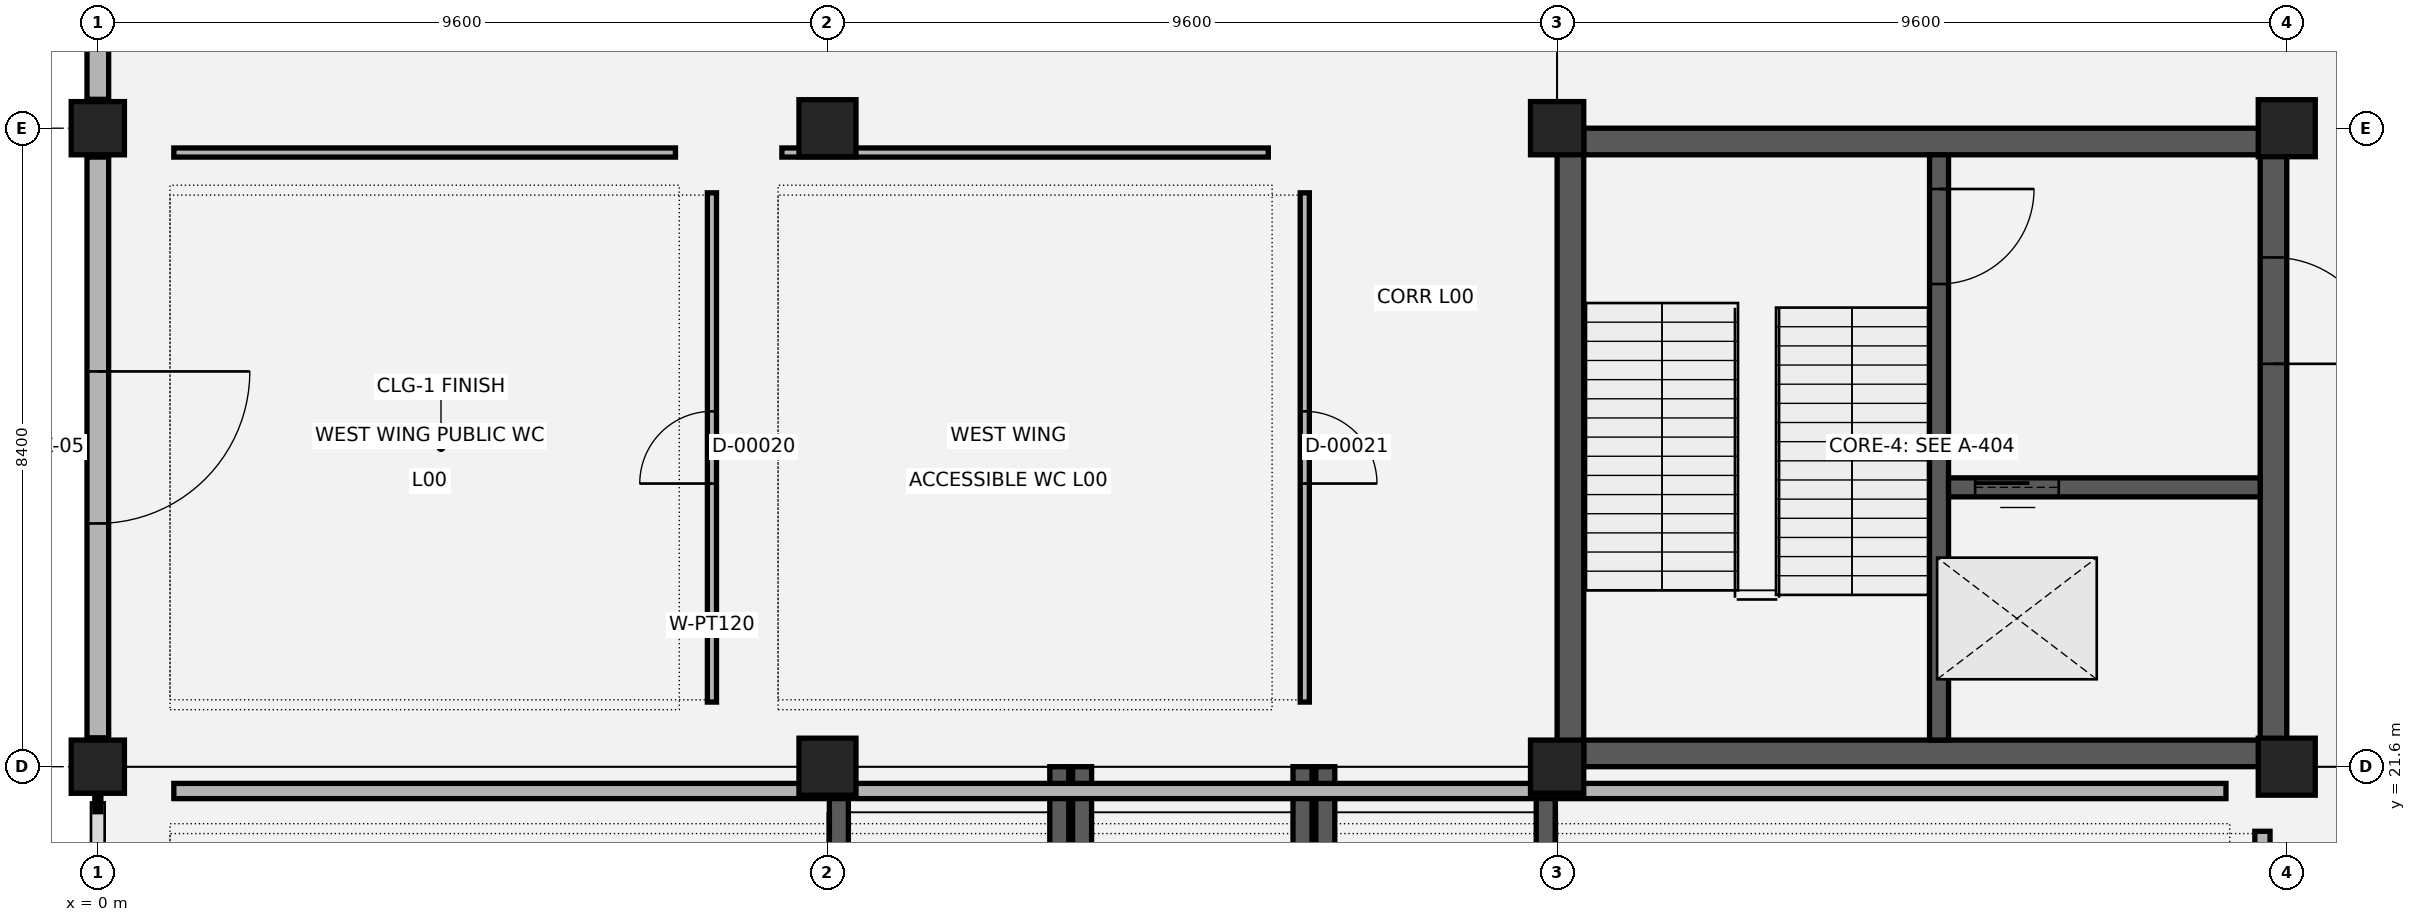
"""IFC4 building model, lengths in metres.
Left out: names, types, materials, properties, quantities, classifications, styles, units other than length and angle.
Written with IfcOpenShell. Run it as: python <this file> out.ifc"""

import sys

from ifc_helpers import new_model, si_unit, direction, frame, frame_2d, origin, origin_2d, place, context, subcontext, project, spatial, rectangle, extrude, element, fill, save


model = new_model("IFC4")
c1 = context("Model", 3, precision=1e-05, world=origin(), true_north=direction((0.0, 1.0)))
c2 = subcontext(c1, "Body", "Model", "MODEL_VIEW")
j1 = project(units=[si_unit("LENGTHUNIT", "METRE"), si_unit("PLANEANGLEUNIT", "RADIAN")], contexts=[c1])
p1 = place(None, origin())
s1 = spatial("IfcSite", under=j1, at=p1, CompositionType="ELEMENT")
p2 = place(p1, origin())
s2 = spatial("IfcBuilding", under=s1, at=p2, CompositionType="ELEMENT")
p3 = place(p2, origin())
s3 = spatial("IfcBuildingStorey", under=s2, at=p3, CompositionType="ELEMENT", Elevation=0.0)
for number, where, z_axis, x_axis in (
    (1, (0.0, 21.6, 0.0), (0.0, 0.0, 1.0), (1.0, 0.0, 0.0)),
    (2, (0.0, 30.0, 0.0), (0.0, 0.0, 1.0), (1.0, 0.0, 0.0)),
):
    element("IfcColumn", number, at=place(p3, frame(where, z_axis=z_axis, x_axis=x_axis)), inside=s3, PredefinedType="COLUMN", context=c2, shape_type="SweptSolid", body=[
        extrude(rectangle(XDim=0.7, YDim=0.7, at=origin_2d()), origin(), (0.0, 0.0, 1.0), 5.4),
    ])
for number, where, z_axis, x_axis in (
    (3, (9.6, 21.6, 0.0), (0.0, 0.0, 1.0), (1.0, 0.0, 0.0)),
    (4, (9.6, 30.0, 0.0), (0.0, 0.0, 1.0), (1.0, 0.0, 0.0)),
):
    element("IfcColumn", number, at=place(p3, frame(where, z_axis=z_axis, x_axis=x_axis)), inside=s3, PredefinedType="COLUMN", context=c2, shape_type="SweptSolid", body=[
        extrude(rectangle(XDim=0.75, YDim=0.75, at=origin_2d()), origin(), (0.0, 0.0, 1.0), 5.4),
    ])
for number, where, z_axis, x_axis in (
    (5, (19.2, 21.6, 0.0), (0.0, 0.0, 1.0), (1.0, 0.0, 0.0)),
    (6, (19.2, 30.0, 0.0), (0.0, 0.0, 1.0), (1.0, 0.0, 0.0)),
):
    element("IfcColumn", number, at=place(p3, frame(where, z_axis=z_axis, x_axis=x_axis)), inside=s3, PredefinedType="COLUMN", context=c2, shape_type="SweptSolid", body=[
        extrude(rectangle(XDim=0.7, YDim=0.7, at=origin_2d()), origin(), (0.0, 0.0, 1.0), 5.4),
    ])
for number, where, z_axis, x_axis in (
    (7, (28.8, 21.6, 0.0), (0.0, 0.0, 1.0), (1.0, 0.0, 0.0)),
    (8, (28.8, 30.0, 0.0), (0.0, 0.0, 1.0), (1.0, 0.0, 0.0)),
):
    element("IfcColumn", number, at=place(p3, frame(where, z_axis=z_axis, x_axis=x_axis)), inside=s3, PredefinedType="COLUMN", context=c2, shape_type="SweptSolid", body=[
        extrude(rectangle(XDim=0.75, YDim=0.75, at=origin_2d()), origin(), (0.0, 0.0, 1.0), 5.4),
    ])
for number, where, z_axis, x_axis in (
    (9, (9.75, 13.2, 0.0), (0.0, 0.0, 1.0), (0.0, 1.0, 0.0)),
    (10, (12.65, 13.2, 0.0), (0.0, 0.0, 1.0), (0.0, 1.0, 0.0)),
):
    element("IfcWall", number, at=place(p3, frame(where, z_axis=z_axis, x_axis=x_axis)), inside=s3, PredefinedType="SHEAR", context=c2, shape_type="SweptSolid", body=[
        extrude(rectangle(XDim=8.4, YDim=0.25, at=frame_2d((4.2, 0.0))), origin(), (0.0, 0.0, 1.0), 0.4),
    ])
for number, where, z_axis, x_axis in (
    (11, (12.95, 13.2, 0.0), (0.0, 0.0, 1.0), (0.0, 1.0, 0.0)),
    (12, (15.85, 13.2, 0.0), (0.0, 0.0, 1.0), (0.0, 1.0, 0.0)),
):
    element("IfcWall", number, at=place(p3, frame(where, z_axis=z_axis, x_axis=x_axis)), inside=s3, PredefinedType="SHEAR", context=c2, shape_type="SweptSolid", body=[
        extrude(rectangle(XDim=8.4, YDim=0.25, at=frame_2d((4.2, 0.0))), origin(), (0.0, 0.0, 1.0), 1.0),
    ])
for number, where, z_axis, x_axis in (
    (13, (16.15, 13.2, 0.0), (0.0, 0.0, 1.0), (0.0, 1.0, 0.0)),
    (14, (19.05, 13.2, 0.0), (0.0, 0.0, 1.0), (0.0, 1.0, 0.0)),
):
    element("IfcWall", number, at=place(p3, frame(where, z_axis=z_axis, x_axis=x_axis)), inside=s3, PredefinedType="SHEAR", context=c2, shape_type="SweptSolid", body=[
        extrude(rectangle(XDim=8.4, YDim=0.25, at=frame_2d((4.2, 0.0))), origin(), (0.0, 0.0, 1.0), 1.6),
    ])
p4 = place(p3, frame((0.0, 29.62, 0.0), z_axis=(0.0, 0.0, 1.0), x_axis=(0.0, -1.0, 0.0)))
e15 = element("IfcWall", 15, at=p4, inside=s3, PredefinedType="SOLIDWALL", context=c2, shape_type="SweptSolid", body=[
    extrude(rectangle(XDim=7.64, YDim=0.285, at=frame_2d((3.82, 0.0))), origin(), (0.0, 0.0, 1.0), 4.04),
])
p5 = place(p4, frame((2.82, 0.0, 0.0)))
e16 = element("IfcOpeningElement", 16, at=p5, cuts=e15, PredefinedType="OPENING", context=c2, shape_type="SweptSolid", body=[
    extrude(rectangle(XDim=2.0, YDim=2.2, at=frame_2d((1.0, 1.1))), frame((0.0, 0.152, 0.0), z_axis=(0.0, -1.0, 0.0), x_axis=(1.0, 0.0, 0.0)), (0.0, 0.0, 1.0), 0.305),
])
p6 = place(p3, frame((0.0, 38.02, 0.0), z_axis=(0.0, 0.0, 1.0), x_axis=(0.0, -1.0, 0.0)))
e17 = element("IfcWall", 17, at=p6, inside=s3, PredefinedType="SOLIDWALL", context=c2, shape_type="SweptSolid", body=[
    extrude(rectangle(XDim=7.64, YDim=0.285, at=frame_2d((3.82, 0.0))), origin(), (0.0, 0.0, 1.0), 4.04),
])
p7 = place(p6, frame((0.635, 0.0, 0.9)))
e18 = element("IfcOpeningElement", 18, at=p7, cuts=e17, PredefinedType="OPENING", context=c2, shape_type="SweptSolid", body=[
    extrude(rectangle(XDim=2.55, YDim=1.75, at=frame_2d((1.275, 0.875))), frame((0.0, 0.152, 0.0), z_axis=(0.0, -1.0, 0.0), x_axis=(1.0, 0.0, 0.0)), (0.0, 0.0, 1.0), 0.305),
])
p8 = place(p6, frame((4.73, 0.0, 0.9)))
e19 = element("IfcOpeningElement", 19, at=p8, cuts=e17, PredefinedType="OPENING", context=c2, shape_type="SweptSolid", body=[
    extrude(rectangle(XDim=2.0, YDim=1.55, at=frame_2d((1.0, 0.775))), frame((0.0, 0.152, 0.0), z_axis=(0.0, -1.0, 0.0), x_axis=(1.0, 0.0, 0.0)), (0.0, 0.0, 1.0), 0.305),
])
for number, where, z_axis, x_axis in (
    (20, (19.2, 29.825, 0.0), (0.0, 0.0, 1.0), (1.0, 0.0, 0.0)),
    (21, (19.2, 21.775, 0.0), (0.0, 0.0, 1.0), (1.0, 0.0, 0.0)),
):
    element("IfcWall", number, at=place(p3, frame(where, z_axis=z_axis, x_axis=x_axis)), inside=s3, PredefinedType="SHEAR", context=c2, shape_type="SweptSolid", body=[
        extrude(rectangle(XDim=9.6, YDim=0.35, at=frame_2d((4.8, 0.0))), origin(), (0.0, 0.0, 1.0), 5.11),
    ])
p9 = place(p3, frame((19.375, 21.6, 0.0), z_axis=(0.0, 0.0, 1.0), x_axis=(0.0, 1.0, 0.0)))
e22 = element("IfcWall", 22, at=p9, inside=s3, PredefinedType="SHEAR", context=c2, shape_type="SweptSolid", body=[
    extrude(rectangle(XDim=8.4, YDim=0.35, at=frame_2d((4.2, 0.0))), origin(), (0.0, 0.0, 1.0), 5.11),
])
p10 = place(p3, frame((28.625, 21.6, 0.0), z_axis=(0.0, 0.0, 1.0), x_axis=(0.0, 1.0, 0.0)))
e23 = element("IfcWall", 23, at=p10, inside=s3, PredefinedType="SHEAR", context=c2, shape_type="SweptSolid", body=[
    extrude(rectangle(XDim=8.4, YDim=0.35, at=frame_2d((4.2, 0.0))), origin(), (0.0, 0.0, 1.0), 5.11),
])
p11 = place(p10, frame((5.3, 0.0, 0.0)))
e24 = element("IfcOpeningElement", 24, at=p11, cuts=e23, PredefinedType="OPENING", context=c2, shape_type="SweptSolid", body=[
    extrude(rectangle(XDim=1.4, YDim=2.15, at=frame_2d((0.7, 1.075))), frame((0.0, 0.185, 0.0), z_axis=(0.0, -1.0, 0.0), x_axis=(1.0, 0.0, 0.0)), (0.0, 0.0, 1.0), 0.37),
])
p12 = place(p3, frame((24.225, 29.65, 0.0), z_axis=(0.0, 0.0, 1.0), x_axis=(0.0, -1.0, 0.0)))
e25 = element("IfcWall", 25, at=p12, inside=s3, PredefinedType="SHEAR", context=c2, shape_type="SweptSolid", body=[
    extrude(rectangle(XDim=7.7, YDim=0.25, at=frame_2d((3.85, 0.0))), origin(), (0.0, 0.0, 1.0), 5.11),
])
p13 = place(p12, frame((0.45, 0.0, 0.0)))
e26 = element("IfcOpeningElement", 26, at=p13, cuts=e25, PredefinedType="OPENING", context=c2, shape_type="SweptSolid", body=[
    extrude(rectangle(XDim=1.25, YDim=2.15, at=frame_2d((0.625, 1.075))), frame((0.0, 0.135, 0.0), z_axis=(0.0, -1.0, 0.0), x_axis=(1.0, 0.0, 0.0)), (0.0, 0.0, 1.0), 0.27),
])
p14 = place(p3, frame((24.35, 25.275, 0.0), z_axis=(0.0, 0.0, 1.0), x_axis=(1.0, 0.0, 0.0)))
e27 = element("IfcWall", 27, at=p14, inside=s3, PredefinedType="SHEAR", context=c2, shape_type="SweptSolid", body=[
    extrude(rectangle(XDim=4.1, YDim=0.25, at=frame_2d((2.05, 0.0))), origin(), (0.0, 0.0, 1.0), 5.11),
])
p15 = place(p14, frame((0.35, 0.0, 0.0)))
e28 = element("IfcOpeningElement", 28, at=p15, cuts=e27, PredefinedType="OPENING", context=c2, shape_type="SweptSolid", body=[
    extrude(rectangle(XDim=1.1, YDim=2.15, at=frame_2d((0.55, 1.075))), frame((0.0, 0.135, 0.0), z_axis=(0.0, -1.0, 0.0), x_axis=(1.0, 0.0, 0.0)), (0.0, 0.0, 1.0), 0.27),
])
p16 = place(p3, frame((28.48, 5.85, 0.0), z_axis=(0.0, 0.0, 1.0), x_axis=(0.0, 1.0, 0.0)))
e29 = element("IfcWall", 29, at=p16, inside=s3, PredefinedType="PARTITIONING", context=c2, shape_type="SweptSolid", body=[
    extrude(rectangle(XDim=14.9, YDim=0.2, at=frame_2d((7.45, 0.0))), origin(), (0.0, 0.0, 1.0), 4.04),
])
p17 = place(p16, frame((2.267, 0.0, 0.0)))
e30 = element("IfcOpeningElement", 30, at=p17, cuts=e29, PredefinedType="OPENING", context=c2, shape_type="SweptSolid", body=[
    extrude(rectangle(XDim=1.65, YDim=2.15, at=frame_2d((0.825, 1.075))), frame((0.0, 0.11, 0.0), z_axis=(0.0, -1.0, 0.0), x_axis=(1.0, 0.0, 0.0)), (0.0, 0.0, 1.0), 0.22),
])
p18 = place(p3, frame((1.0, 21.28, 0.0), z_axis=(0.0, 0.0, 1.0), x_axis=(1.0, 0.0, 0.0)))
e31 = element("IfcWall", 31, at=p18, inside=s3, PredefinedType="PARTITIONING", context=c2, shape_type="SweptSolid", body=[
    extrude(rectangle(XDim=27.0, YDim=0.2, at=frame_2d((13.5, 0.0))), origin(), (0.0, 0.0, 1.0), 4.04),
])
p19 = place(p3, frame((8.08, 22.45, 0.0), z_axis=(0.0, 0.0, 1.0), x_axis=(0.0, 1.0, 0.0)))
e32 = element("IfcWall", 32, at=p19, inside=s3, PredefinedType="PARTITIONING", context=c2, shape_type="SweptSolid", body=[
    extrude(rectangle(XDim=6.7, YDim=0.12, at=frame_2d((3.35, 0.0))), origin(), (0.0, 0.0, 1.0), 4.04),
])
p20 = place(p19, frame((2.875, 0.0, 0.0)))
e33 = element("IfcOpeningElement", 33, at=p20, cuts=e32, PredefinedType="OPENING", context=c2, shape_type="SweptSolid", body=[
    extrude(rectangle(XDim=0.95, YDim=2.1, at=frame_2d((0.475, 1.05))), frame((0.0, 0.07, 0.0), z_axis=(0.0, -1.0, 0.0), x_axis=(1.0, 0.0, 0.0)), (0.0, 0.0, 1.0), 0.14),
])
p21 = place(p3, frame((1.0, 29.68, 0.0), z_axis=(0.0, 0.0, 1.0), x_axis=(1.0, 0.0, 0.0)))
e34 = element("IfcWall", 34, at=p21, inside=s3, PredefinedType="PARTITIONING", context=c2, shape_type="SweptSolid", body=[
    extrude(rectangle(XDim=6.6, YDim=0.12, at=frame_2d((3.3, 0.0))), origin(), (0.0, 0.0, 1.0), 4.04),
])
p22 = place(p3, frame((15.88, 22.45, 0.0), z_axis=(0.0, 0.0, 1.0), x_axis=(0.0, 1.0, 0.0)))
e35 = element("IfcWall", 35, at=p22, inside=s3, PredefinedType="PARTITIONING", context=c2, shape_type="SweptSolid", body=[
    extrude(rectangle(XDim=6.7, YDim=0.12, at=frame_2d((3.35, 0.0))), origin(), (0.0, 0.0, 1.0), 4.04),
])
p23 = place(p22, frame((2.875, 0.0, 0.0)))
e36 = element("IfcOpeningElement", 36, at=p23, cuts=e35, PredefinedType="OPENING", context=c2, shape_type="SweptSolid", body=[
    extrude(rectangle(XDim=0.95, YDim=2.1, at=frame_2d((0.475, 1.05))), frame((0.0, 0.07, 0.0), z_axis=(0.0, -1.0, 0.0), x_axis=(1.0, 0.0, 0.0)), (0.0, 0.0, 1.0), 0.14),
])
p24 = place(p3, frame((9.0, 29.68, 0.0), z_axis=(0.0, 0.0, 1.0), x_axis=(1.0, 0.0, 0.0)))
e37 = element("IfcWall", 37, at=p24, inside=s3, PredefinedType="PARTITIONING", context=c2, shape_type="SweptSolid", body=[
    extrude(rectangle(XDim=6.4, YDim=0.12, at=frame_2d((3.2, 0.0))), origin(), (0.0, 0.0, 1.0), 4.04),
])
p25 = place(p5, origin())
e38 = element("IfcDoor", 38, at=p25, inside=s3, OperationType="SINGLE_SWING_LEFT", PredefinedType="DOOR", context=c2, shape_type="SweptSolid", body=[
    extrude(rectangle(XDim=2.0, YDim=2.2, at=frame_2d((1.0, 1.1))), frame((0.0, 0.025, 0.0), z_axis=(0.0, -1.0, 0.0), x_axis=(1.0, 0.0, 0.0)), (0.0, 0.0, 1.0), 0.05),
])
fill(e16, e38)
p26 = place(p13, origin())
e39 = element("IfcDoor", 39, at=p26, inside=s3, OperationType="SINGLE_SWING_LEFT", PredefinedType="DOOR", context=c2, shape_type="SweptSolid", body=[
    extrude(rectangle(XDim=1.25, YDim=2.15, at=frame_2d((0.625, 1.075))), frame((0.0, 0.025, 0.0), z_axis=(0.0, -1.0, 0.0), x_axis=(1.0, 0.0, 0.0)), (0.0, 0.0, 1.0), 0.05),
])
fill(e26, e39)
p27 = place(p15, origin())
e40 = element("IfcDoor", 40, at=p27, inside=s3, OperationType="SLIDING_TO_LEFT", PredefinedType="DOOR", context=c2, shape_type="SweptSolid", body=[
    extrude(rectangle(XDim=1.1, YDim=2.15, at=frame_2d((0.55, 1.075))), frame((0.0, 0.025, 0.0), z_axis=(0.0, -1.0, 0.0), x_axis=(1.0, 0.0, 0.0)), (0.0, 0.0, 1.0), 0.05),
])
fill(e28, e40)
p28 = place(p11, origin())
e41 = element("IfcDoor", 41, at=p28, inside=s3, OperationType="SINGLE_SWING_RIGHT", PredefinedType="DOOR", context=c2, shape_type="SweptSolid", body=[
    extrude(rectangle(XDim=1.4, YDim=2.15, at=frame_2d((0.7, 1.075))), frame((0.0, 0.025, 0.0), z_axis=(0.0, -1.0, 0.0), x_axis=(1.0, 0.0, 0.0)), (0.0, 0.0, 1.0), 0.05),
])
fill(e24, e41)
p29 = place(p20, origin())
e42 = element("IfcDoor", 42, at=p29, inside=s3, OperationType="SINGLE_SWING_LEFT", PredefinedType="DOOR", context=c2, shape_type="SweptSolid", body=[
    extrude(rectangle(XDim=0.95, YDim=2.1, at=frame_2d((0.475, 1.05))), frame((0.0, 0.025, 0.0), z_axis=(0.0, -1.0, 0.0), x_axis=(1.0, 0.0, 0.0)), (0.0, 0.0, 1.0), 0.05),
])
fill(e33, e42)
p30 = place(p23, origin())
e43 = element("IfcDoor", 43, at=p30, inside=s3, OperationType="SINGLE_SWING_RIGHT", PredefinedType="DOOR", context=c2, shape_type="SweptSolid", body=[
    extrude(rectangle(XDim=0.95, YDim=2.1, at=frame_2d((0.475, 1.05))), frame((0.0, 0.025, 0.0), z_axis=(0.0, -1.0, 0.0), x_axis=(1.0, 0.0, 0.0)), (0.0, 0.0, 1.0), 0.05),
])
fill(e36, e43)
save(model, sys.argv[1])
